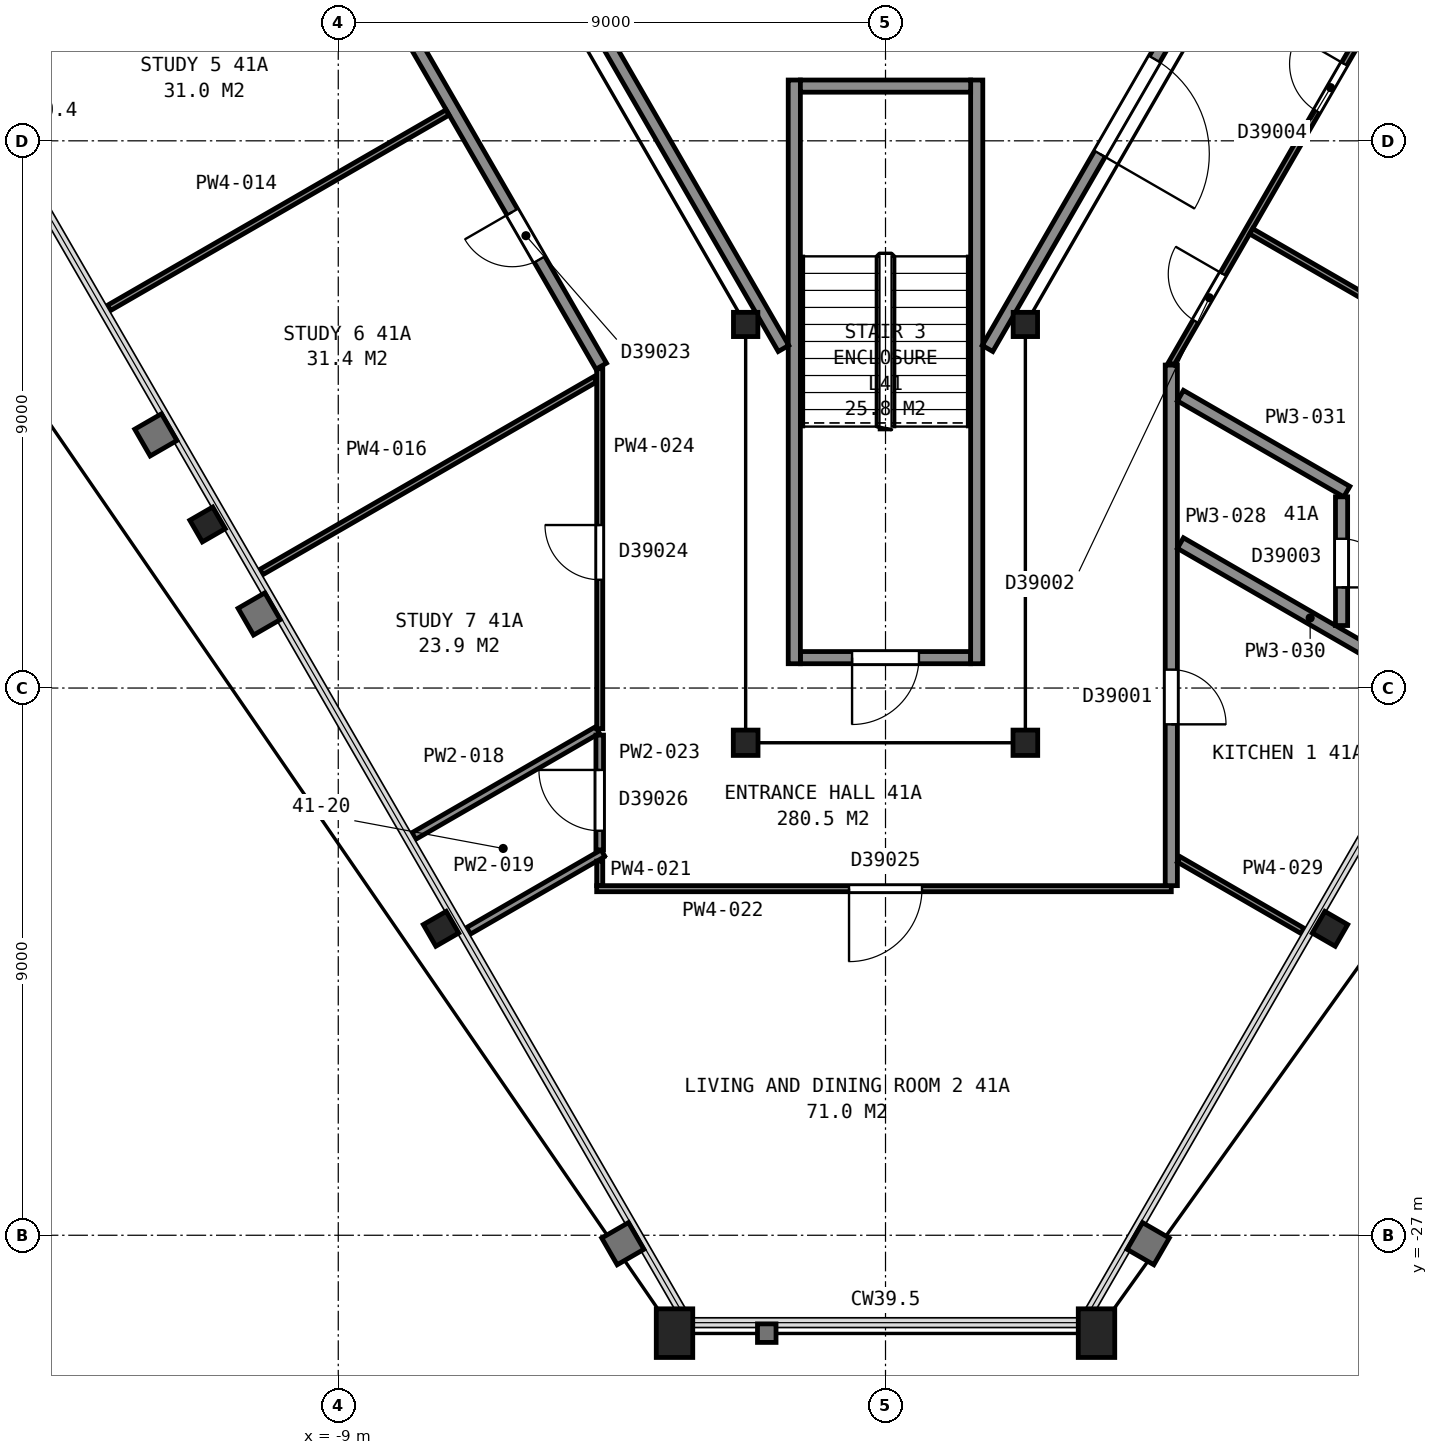
"""IFC4 building model, lengths in metres.
Left out: names, types, materials, properties, quantities, classifications, styles, units other than length and angle.
Written with IfcOpenShell. Run it as: python <this file> out.ifc"""

import sys

from ifc_helpers import new_model, si_unit, direction, frame, frame_2d, origin, origin_2d, place, context, subcontext, project, spatial, rectangle, hollow_rectangle, i_section, extrude, element, fill, save


model = new_model("IFC4")
c1 = context("Model", 3, precision=1e-05, world=origin(), true_north=direction((0.0, 1.0)))
c2 = subcontext(c1, "Body", "Model", "MODEL_VIEW")
j1 = project(units=[si_unit("LENGTHUNIT", "METRE"), si_unit("PLANEANGLEUNIT", "RADIAN")], contexts=[c1])
p1 = place(None, origin())
s1 = spatial("IfcSite", under=j1, at=p1, CompositionType="ELEMENT")
p2 = place(p1, origin())
s2 = spatial("IfcBuilding", under=s1, at=p2, CompositionType="ELEMENT")
p3 = place(p2, frame((0.0, 0.0, 167.3)))
s3 = spatial("IfcBuildingStorey", under=s2, at=p3, CompositionType="ELEMENT", Elevation=167.3)
for number, where, z_axis, x_axis in (
    (1, (-11.15, -15.31, 0.0), (0.0, 0.0, 1.0), (-0.5, 0.866, 0.0)),
    (2, (-7.31, -21.96, 0.0), (0.0, 0.0, 1.0), (-0.5, 0.866, 0.0)),
):
    element("IfcColumn", number, at=place(p3, frame(where, z_axis=z_axis, x_axis=x_axis)), inside=s3, PredefinedType="COLUMN", context=c2, shape_type="SweptSolid", body=[
        extrude(i_section(OverallWidth=0.411, OverallDepth=0.434, WebThickness=0.036, FlangeThickness=0.057, FilletRadius=0.015, at=origin_2d()), origin(), (0.0, 0.0, 1.0), 3.7),
    ])
for number, where, z_axis, x_axis in (
    (3, (-3.47, -28.61, 0.0), (0.0, 0.0, 1.0), (-1.0, 0.0, 0.0)),
    (4, (3.47, -28.61, 0.0), (0.0, 0.0, 1.0), (-1.0, 0.0, 0.0)),
):
    element("IfcColumn", number, at=place(p3, frame(where, z_axis=z_axis, x_axis=x_axis)), inside=s3, PredefinedType="COLUMN", context=c2, shape_type="SweptSolid", body=[
        extrude(hollow_rectangle(XDim=0.6, YDim=0.8, WallThickness=0.05, at=origin_2d()), origin(), (0.0, 0.0, 1.0), 3.7),
    ])
p4 = place(p3, frame((7.31, -21.96, 0.0), z_axis=(0.0, 0.0, 1.0), x_axis=(-0.5, -0.866025403784, 0.0)))
e5 = element("IfcColumn", 5, at=p4, inside=s3, PredefinedType="COLUMN", context=c2, shape_type="SweptSolid", body=[
    extrude(i_section(OverallWidth=0.411, OverallDepth=0.434, WebThickness=0.036, FlangeThickness=0.057, FilletRadius=0.015, at=origin_2d()), origin(), (0.0, 0.0, 1.0), 3.7),
])
p5 = place(p3, frame((-2.3, -12.02, 0.0), z_axis=(0.0, 0.0, 1.0), x_axis=(1.0, 0.0, 0.0)))
e6 = element("IfcColumn", 6, at=p5, inside=s3, PredefinedType="COLUMN", context=c2, shape_type="SweptSolid", body=[
    extrude(i_section(OverallWidth=0.401, OverallDepth=0.399, WebThickness=0.025, FlangeThickness=0.04, FilletRadius=0.015, at=origin_2d()), origin(), (0.0, 0.0, 1.0), 3.7),
])
for number, where, z_axis, x_axis in (
    (7, (-2.3, -18.9, 0.0), (0.0, 0.0, 1.0), (-1.0, 0.0, 0.0)),
    (8, (2.3, -18.9, 0.0), (0.0, 0.0, 1.0), (-1.0, 0.0, 0.0)),
):
    element("IfcColumn", number, at=place(p3, frame(where, z_axis=z_axis, x_axis=x_axis)), inside=s3, PredefinedType="COLUMN", context=c2, shape_type="SweptSolid", body=[
        extrude(i_section(OverallWidth=0.406, OverallDepth=0.417, WebThickness=0.03, FlangeThickness=0.048, FilletRadius=0.015, at=origin_2d()), origin(), (0.0, 0.0, 1.0), 3.7),
    ])
p6 = place(p3, frame((2.3, -12.02, 0.0), z_axis=(0.0, 0.0, 1.0), x_axis=(1.0, 0.0, 0.0)))
e9 = element("IfcColumn", 9, at=p6, inside=s3, PredefinedType="COLUMN", context=c2, shape_type="SweptSolid", body=[
    extrude(i_section(OverallWidth=0.401, OverallDepth=0.399, WebThickness=0.025, FlangeThickness=0.04, FilletRadius=0.015, at=origin_2d()), origin(), (0.0, 0.0, 1.0), 3.7),
])
p7 = place(p3, frame((-1.4, -17.5, 0.0), z_axis=(0.0, 0.0, 1.0), x_axis=(1.0, 0.0, 0.0)))
e10 = element("IfcWall", 10, at=p7, inside=s3, PredefinedType="PARTITIONING", context=c2, shape_type="SweptSolid", body=[
    extrude(rectangle(XDim=2.8, YDim=0.2, at=frame_2d((1.4, 0.0))), origin(), (0.0, 0.0, 1.0), 3.45),
])
p8 = place(p7, frame((0.85, 0.0, 0.0)))
e11 = element("IfcOpeningElement", 11, at=p8, cuts=e10, PredefinedType="OPENING", context=c2, shape_type="SweptSolid", body=[
    extrude(rectangle(XDim=1.1, YDim=2.1, at=frame_2d((0.55, 1.05))), frame((0.0, 0.11, 0.0), z_axis=(0.0, -1.0, 0.0), x_axis=(1.0, 0.0, 0.0)), (0.0, 0.0, 1.0), 0.22),
])
for number, where, z_axis, x_axis in (
    (12, (1.5, -8.0, 0.0), (0.0, 0.0, 1.0), (0.0, -1.0, 0.0)),
    (13, (-1.5, -8.0, 0.0), (0.0, 0.0, 1.0), (0.0, -1.0, 0.0)),
):
    element("IfcWall", number, at=place(p3, frame(where, z_axis=z_axis, x_axis=x_axis)), inside=s3, PredefinedType="PARTITIONING", context=c2, shape_type="SweptSolid", body=[
        extrude(rectangle(XDim=9.6, YDim=0.2, at=frame_2d((4.8, 0.0))), origin(), (0.0, 0.0, 1.0), 3.45),
    ])
p9 = place(p3, frame((-1.4, -8.1, 0.0), z_axis=(0.0, 0.0, 1.0), x_axis=(1.0, 0.0, 0.0)))
e14 = element("IfcWall", 14, at=p9, inside=s3, PredefinedType="PARTITIONING", context=c2, shape_type="SweptSolid", body=[
    extrude(rectangle(XDim=2.8, YDim=0.2, at=frame_2d((1.4, 0.0))), origin(), (0.0, 0.0, 1.0), 3.45),
])
p10 = place(p3, frame((-4.655, -7.257, 0.0), z_axis=(0.0, 0.0, 1.0), x_axis=(0.499966124405, -0.866044960985, 0.0)))
e15 = element("IfcWall", 15, at=p10, inside=s3, PredefinedType="PARTITIONING", context=c2, shape_type="SweptSolid", body=[
    extrude(rectangle(XDim=5.956, YDim=0.2, at=frame_2d((2.978, 0.0))), origin(), (0.0, 0.0, 1.0), 3.45),
])
p11 = place(p3, frame((1.677, -12.415, 0.0), z_axis=(0.0, 0.0, 1.0), x_axis=(0.500054337157, 0.865994029939, 0.0)))
e16 = element("IfcWall", 16, at=p11, inside=s3, PredefinedType="PARTITIONING", context=c2, shape_type="SweptSolid", body=[
    extrude(rectangle(XDim=6.177, YDim=0.2, at=frame_2d((3.088, 0.0))), origin(), (0.0, 0.0, 1.0), 3.45),
])
p12 = place(p11, frame((3.695, 0.0, 0.0)))
e17 = element("IfcOpeningElement", 17, at=p12, cuts=e16, PredefinedType="OPENING", context=c2, shape_type="SweptSolid", body=[
    extrude(rectangle(XDim=1.8, YDim=2.1, at=frame_2d((0.9, 1.05))), frame((0.0, 0.11, 0.0), z_axis=(0.0, -1.0, 0.0), x_axis=(1.0, 0.0, 0.0)), (0.0, 0.0, 1.0), 0.22),
])
p13 = place(p3, frame((-4.675, -12.706, 0.0), z_axis=(0.0, 0.0, 1.0), x_axis=(-0.499972470324, 0.866041297467, 0.0)))
e18 = element("IfcWall", 18, at=p13, inside=s3, PredefinedType="PARTITIONING", context=c2, shape_type="SweptSolid", body=[
    extrude(rectangle(XDim=17.385, YDim=0.2, at=frame_2d((8.692, 0.0))), origin(), (0.0, 0.0, 1.0), 2.713),
])
p14 = place(p13, frame((15.435, 0.0, 0.0)))
e19 = element("IfcOpeningElement", 19, at=p14, cuts=e18, PredefinedType="OPENING", context=c2, shape_type="SweptSolid", body=[
    extrude(rectangle(XDim=0.9, YDim=2.1, at=frame_2d((0.45, 1.05))), frame((0.0, 0.11, 0.0), z_axis=(0.0, -1.0, 0.0), x_axis=(1.0, 0.0, 0.0)), (0.0, 0.0, 1.0), 0.22),
])
p15 = place(p13, frame((12.835, 0.0, 0.0)))
e20 = element("IfcOpeningElement", 20, at=p15, cuts=e18, PredefinedType="OPENING", context=c2, shape_type="SweptSolid", body=[
    extrude(rectangle(XDim=0.9, YDim=2.1, at=frame_2d((0.45, 1.05))), frame((0.0, 0.11, 0.0), z_axis=(0.0, -1.0, 0.0), x_axis=(1.0, 0.0, 0.0)), (0.0, 0.0, 1.0), 0.22),
])
p16 = place(p13, frame((6.941, 0.0, 0.0)))
e21 = element("IfcOpeningElement", 21, at=p16, cuts=e18, PredefinedType="OPENING", context=c2, shape_type="SweptSolid", body=[
    extrude(rectangle(XDim=0.9, YDim=2.1, at=frame_2d((0.45, 1.05))), frame((0.0, 0.11, 0.0), z_axis=(0.0, -1.0, 0.0), x_axis=(1.0, 0.0, 0.0)), (0.0, 0.0, 1.0), 0.22),
])
p17 = place(p13, frame((2.028, 0.0, 0.0)))
e22 = element("IfcOpeningElement", 22, at=p17, cuts=e18, PredefinedType="OPENING", context=c2, shape_type="SweptSolid", body=[
    extrude(rectangle(XDim=0.9, YDim=2.1, at=frame_2d((0.45, 1.05))), frame((0.0, 0.11, 0.0), z_axis=(0.0, -1.0, 0.0), x_axis=(1.0, 0.0, 0.0)), (0.0, 0.0, 1.0), 0.22),
])
p18 = place(p3, frame((-12.772, -11.749, 0.0), z_axis=(0.0, 0.0, 1.0), x_axis=(0.866026229868, 0.499998569178, 0.0)))
e23 = element("IfcWall", 23, at=p18, inside=s3, PredefinedType="PARTITIONING", context=c2, shape_type="SweptSolid", body=[
    extrude(rectangle(XDim=6.429, YDim=0.1, at=frame_2d((3.215, 0.0))), origin(), (0.0, 0.0, 1.0), 2.713),
])
p19 = place(p3, frame((-10.264, -16.092, 0.0), z_axis=(0.0, 0.0, 1.0), x_axis=(0.86602074738, 0.500008065043, 0.0)))
e24 = element("IfcWall", 24, at=p19, inside=s3, PredefinedType="PARTITIONING", context=c2, shape_type="SweptSolid", body=[
    extrude(rectangle(XDim=6.339, YDim=0.1, at=frame_2d((3.169, 0.0))), origin(), (0.0, 0.0, 1.0), 2.713),
])
p20 = place(p3, frame((-7.758, -20.434, 0.0), z_axis=(0.0, 0.0, 1.0), x_axis=(0.866090019653, 0.499888065328, 0.0)))
e25 = element("IfcWall", 25, at=p20, inside=s3, PredefinedType="PARTITIONING", context=c2, shape_type="SweptSolid", body=[
    extrude(rectangle(XDim=3.488, YDim=0.125, at=frame_2d((1.744, 0.0))), origin(), (0.0, 0.0, 1.0), 2.713),
])
p21 = place(p3, frame((-6.858, -21.993, 0.0), z_axis=(0.0, 0.0, 1.0), x_axis=(0.865992952931, 0.500056202316, 0.0)))
e26 = element("IfcWall", 26, at=p21, inside=s3, PredefinedType="PARTITIONING", context=c2, shape_type="SweptSolid", body=[
    extrude(rectangle(XDim=2.554, YDim=0.125, at=frame_2d((1.277, 0.0))), origin(), (0.0, 0.0, 1.0), 2.713),
])
p22 = place(p3, frame((-4.7, -21.25, 0.0), z_axis=(0.0, 0.0, 1.0), x_axis=(0.0, 1.0, 0.0)))
e27 = element("IfcWall", 27, at=p22, inside=s3, PredefinedType="PARTITIONING", context=c2, shape_type="SweptSolid", body=[
    extrude(rectangle(XDim=0.403, YDim=0.1, at=frame_2d((0.202, 0.0))), origin(), (0.0, 0.0, 1.0), 2.713),
])
p23 = place(p3, frame((4.7, -21.3, 0.0), z_axis=(0.0, 0.0, 1.0), x_axis=(-1.0, 0.0, 0.0)))
e28 = element("IfcWall", 28, at=p23, inside=s3, PredefinedType="PARTITIONING", context=c2, shape_type="SweptSolid", body=[
    extrude(rectangle(XDim=9.45, YDim=0.1, at=frame_2d((4.725, 0.0))), origin(), (0.0, 0.0, 1.0), 2.713),
])
p24 = place(p23, frame((4.1, 0.0, 0.0)))
e29 = element("IfcOpeningElement", 29, at=p24, cuts=e28, PredefinedType="OPENING", context=c2, shape_type="SweptSolid", body=[
    extrude(rectangle(XDim=1.2, YDim=2.1, at=frame_2d((0.6, 1.05))), frame((0.0, 0.06, 0.0), z_axis=(0.0, -1.0, 0.0), x_axis=(1.0, 0.0, 0.0)), (0.0, 0.0, 1.0), 0.12),
])
p25 = place(p3, frame((-4.7, -18.774, 0.0), z_axis=(0.0, 0.0, 1.0), x_axis=(0.0, -1.0, 0.0)))
e30 = element("IfcWall", 30, at=p25, inside=s3, PredefinedType="PARTITIONING", context=c2, shape_type="SweptSolid", body=[
    extrude(rectangle(XDim=1.888, YDim=0.125, at=frame_2d((0.944, 0.0))), origin(), (0.0, 0.0, 1.0), 2.713),
])
p26 = place(p25, frame((0.573, 0.0, 0.0)))
e31 = element("IfcOpeningElement", 31, at=p26, cuts=e30, PredefinedType="OPENING", context=c2, shape_type="SweptSolid", body=[
    extrude(rectangle(XDim=1.0, YDim=2.1, at=frame_2d((0.5, 1.05))), frame((0.0, 0.073, 0.0), z_axis=(0.0, -1.0, 0.0), x_axis=(1.0, 0.0, 0.0)), (0.0, 0.0, 1.0), 0.145),
])
p27 = place(p3, frame((-4.7, -18.669, 0.0), z_axis=(0.0, 0.0, 1.0), x_axis=(0.0, 1.0, 0.0)))
e32 = element("IfcWall", 32, at=p27, inside=s3, PredefinedType="PARTITIONING", context=c2, shape_type="SweptSolid", body=[
    extrude(rectangle(XDim=5.921, YDim=0.1, at=frame_2d((2.96, 0.0))), origin(), (0.0, 0.0, 1.0), 2.713),
])
p28 = place(p27, frame((2.45, 0.0, 0.0)))
e33 = element("IfcOpeningElement", 33, at=p28, cuts=e32, PredefinedType="OPENING", context=c2, shape_type="SweptSolid", body=[
    extrude(rectangle(XDim=0.9, YDim=2.1, at=frame_2d((0.45, 1.05))), frame((0.0, 0.06, 0.0), z_axis=(0.0, -1.0, 0.0), x_axis=(1.0, 0.0, 0.0)), (0.0, 0.0, 1.0), 0.12),
])
p29 = place(p3, frame((4.7, -12.688, 0.0), z_axis=(0.0, 0.0, 1.0), x_axis=(0.0, -1.0, 0.0)))
e34 = element("IfcWall", 34, at=p29, inside=s3, PredefinedType="PARTITIONING", context=c2, shape_type="SweptSolid", body=[
    extrude(rectangle(XDim=8.562, YDim=0.2, at=frame_2d((4.281, 0.0))), origin(), (0.0, 0.0, 1.0), 2.713),
])
p30 = place(p29, frame((5.009, 0.0, 0.0)))
e35 = element("IfcOpeningElement", 35, at=p30, cuts=e34, PredefinedType="OPENING", context=c2, shape_type="SweptSolid", body=[
    extrude(rectangle(XDim=0.9, YDim=2.1, at=frame_2d((0.45, 1.05))), frame((0.0, 0.11, 0.0), z_axis=(0.0, -1.0, 0.0), x_axis=(1.0, 0.0, 0.0)), (0.0, 0.0, 1.0), 0.22),
])
p31 = place(p3, frame((4.825, -20.819, 0.0), z_axis=(0.0, 0.0, 1.0), x_axis=(0.865981189106, -0.500076574252, 0.0)))
e36 = element("IfcWall", 36, at=p31, inside=s3, PredefinedType="PARTITIONING", context=c2, shape_type="SweptSolid", body=[
    extrude(rectangle(XDim=2.347, YDim=0.1, at=frame_2d((1.174, 0.0))), origin(), (0.0, 0.0, 1.0), 2.713),
])
p32 = place(p3, frame((4.85, -15.615, 0.0), z_axis=(0.0, 0.0, 1.0), x_axis=(0.866057699548, -0.499944057923, 0.0)))
e37 = element("IfcWall", 37, at=p32, inside=s3, PredefinedType="PARTITIONING", context=c2, shape_type="SweptSolid", body=[
    extrude(rectangle(XDim=4.927, YDim=0.2, at=frame_2d((2.464, 0.0))), origin(), (0.0, 0.0, 1.0), 2.713),
])
p33 = place(p3, frame((4.85, -13.191, 0.0), z_axis=(0.0, 0.0, 1.0), x_axis=(0.866109679077, -0.499854002494, 0.0)))
e38 = element("IfcWall", 38, at=p33, inside=s3, PredefinedType="PARTITIONING", context=c2, shape_type="SweptSolid", body=[
    extrude(rectangle(XDim=3.16, YDim=0.2, at=frame_2d((1.58, 0.0))), origin(), (0.0, 0.0, 1.0), 2.713),
])
p34 = place(p3, frame((13.342, 2.306, 0.0), z_axis=(0.0, 0.0, 1.0), x_axis=(-0.49997635812, -0.866039053, 0.0)))
e39 = element("IfcWall", 39, at=p34, inside=s3, PredefinedType="PARTITIONING", context=c2, shape_type="SweptSolid", body=[
    extrude(rectangle(XDim=17.285, YDim=0.1, at=frame_2d((8.643, 0.0))), origin(), (0.0, 0.0, 1.0), 2.713),
])
p35 = place(p34, frame((15.585, 0.0, 0.0)))
e40 = element("IfcOpeningElement", 40, at=p35, cuts=e39, PredefinedType="OPENING", context=c2, shape_type="SweptSolid", body=[
    extrude(rectangle(XDim=0.9, YDim=2.1, at=frame_2d((0.45, 1.05))), frame((0.0, 0.06, 0.0), z_axis=(0.0, -1.0, 0.0), x_axis=(1.0, 0.0, 0.0)), (0.0, 0.0, 1.0), 0.12),
])
p36 = place(p34, frame((11.595, 0.0, 0.0)))
e41 = element("IfcOpeningElement", 41, at=p36, cuts=e39, PredefinedType="OPENING", context=c2, shape_type="SweptSolid", body=[
    extrude(rectangle(XDim=0.9, YDim=2.1, at=frame_2d((0.45, 1.05))), frame((0.0, 0.06, 0.0), z_axis=(0.0, -1.0, 0.0), x_axis=(1.0, 0.0, 0.0)), (0.0, 0.0, 1.0), 0.12),
])
p37 = place(p34, frame((6.171, 0.0, 0.0)))
e42 = element("IfcOpeningElement", 42, at=p37, cuts=e39, PredefinedType="OPENING", context=c2, shape_type="SweptSolid", body=[
    extrude(rectangle(XDim=0.9, YDim=2.1, at=frame_2d((0.45, 1.05))), frame((0.0, 0.06, 0.0), z_axis=(0.0, -1.0, 0.0), x_axis=(1.0, 0.0, 0.0)), (0.0, 0.0, 1.0), 0.12),
])
p38 = place(p3, frame((6.013, -10.488, 0.0), z_axis=(0.0, 0.0, 1.0), x_axis=(0.86599118531, -0.500059263454, 0.0)))
e43 = element("IfcWall", 43, at=p38, inside=s3, PredefinedType="PARTITIONING", context=c2, shape_type="SweptSolid", body=[
    extrude(rectangle(XDim=6.484, YDim=0.1, at=frame_2d((3.242, 0.0))), origin(), (0.0, 0.0, 1.0), 2.713),
])
p39 = place(p3, frame((7.5, -16.972, 0.0), z_axis=(0.0, 0.0, 1.0), x_axis=(0.0, 1.0, 0.0)))
e44 = element("IfcWall", 44, at=p39, inside=s3, PredefinedType="PARTITIONING", context=c2, shape_type="SweptSolid", body=[
    extrude(rectangle(XDim=2.117, YDim=0.2, at=frame_2d((1.059, 0.0))), origin(), (0.0, 0.0, 1.0), 2.713),
])
p40 = place(p39, frame((0.627, 0.0, 0.0)))
e45 = element("IfcOpeningElement", 45, at=p40, cuts=e44, PredefinedType="OPENING", context=c2, shape_type="SweptSolid", body=[
    extrude(rectangle(XDim=0.8, YDim=2.1, at=frame_2d((0.4, 1.05))), frame((0.0, 0.11, 0.0), z_axis=(0.0, -1.0, 0.0), x_axis=(1.0, 0.0, 0.0)), (0.0, 0.0, 1.0), 0.22),
])
p41 = place(p8, origin())
e46 = element("IfcDoor", 46, at=p41, inside=s3, OperationType="SINGLE_SWING_LEFT", PredefinedType="DOOR", context=c2, shape_type="SweptSolid", body=[
    extrude(rectangle(XDim=1.1, YDim=2.1, at=frame_2d((0.55, 1.05))), frame((0.0, 0.025, 0.0), z_axis=(0.0, -1.0, 0.0), x_axis=(1.0, 0.0, 0.0)), (0.0, 0.0, 1.0), 0.05),
])
fill(e11, e46)
p42 = place(p12, origin())
e47 = element("IfcDoor", 47, at=p42, inside=s3, OperationType="DOUBLE_DOOR_SINGLE_SWING", PredefinedType="DOOR", context=c2, shape_type="SweptSolid", body=[
    extrude(rectangle(XDim=1.8, YDim=2.1, at=frame_2d((0.9, 1.05))), frame((0.0, 0.025, 0.0), z_axis=(0.0, -1.0, 0.0), x_axis=(1.0, 0.0, 0.0)), (0.0, 0.0, 1.0), 0.05),
])
fill(e17, e47)
p43 = place(p17, origin())
e48 = element("IfcDoor", 48, at=p43, inside=s3, OperationType="SINGLE_SWING_RIGHT", PredefinedType="DOOR", context=c2, shape_type="SweptSolid", body=[
    extrude(rectangle(XDim=0.9, YDim=2.1, at=frame_2d((0.45, 1.05))), frame((0.0, 0.025, 0.0), z_axis=(0.0, -1.0, 0.0), x_axis=(1.0, 0.0, 0.0)), (0.0, 0.0, 1.0), 0.05),
])
fill(e22, e48)
p44 = place(p24, origin())
e49 = element("IfcDoor", 49, at=p44, inside=s3, OperationType="SINGLE_SWING_RIGHT", PredefinedType="DOOR", context=c2, shape_type="SweptSolid", body=[
    extrude(rectangle(XDim=1.2, YDim=2.1, at=frame_2d((0.6, 1.05))), frame((0.0, 0.025, 0.0), z_axis=(0.0, -1.0, 0.0), x_axis=(1.0, 0.0, 0.0)), (0.0, 0.0, 1.0), 0.05),
])
fill(e29, e49)
p45 = place(p26, origin())
e50 = element("IfcDoor", 50, at=p45, inside=s3, OperationType="SINGLE_SWING_LEFT", PredefinedType="DOOR", context=c2, shape_type="SweptSolid", body=[
    extrude(rectangle(XDim=1.0, YDim=2.1, at=frame_2d((0.5, 1.05))), frame((0.0, 0.025, 0.0), z_axis=(0.0, -1.0, 0.0), x_axis=(1.0, 0.0, 0.0)), (0.0, 0.0, 1.0), 0.05),
])
fill(e31, e50)
p46 = place(p28, origin())
e51 = element("IfcDoor", 51, at=p46, inside=s3, OperationType="SINGLE_SWING_RIGHT", PredefinedType="DOOR", context=c2, shape_type="SweptSolid", body=[
    extrude(rectangle(XDim=0.9, YDim=2.1, at=frame_2d((0.45, 1.05))), frame((0.0, 0.025, 0.0), z_axis=(0.0, -1.0, 0.0), x_axis=(1.0, 0.0, 0.0)), (0.0, 0.0, 1.0), 0.05),
])
fill(e33, e51)
p47 = place(p30, origin())
e52 = element("IfcDoor", 52, at=p47, inside=s3, OperationType="SINGLE_SWING_RIGHT", PredefinedType="DOOR", context=c2, shape_type="SweptSolid", body=[
    extrude(rectangle(XDim=0.9, YDim=2.1, at=frame_2d((0.45, 1.05))), frame((0.0, 0.025, 0.0), z_axis=(0.0, -1.0, 0.0), x_axis=(1.0, 0.0, 0.0)), (0.0, 0.0, 1.0), 0.05),
])
fill(e35, e52)
p48 = place(p35, origin())
e53 = element("IfcDoor", 53, at=p48, inside=s3, OperationType="SINGLE_SWING_LEFT", PredefinedType="DOOR", context=c2, shape_type="SweptSolid", body=[
    extrude(rectangle(XDim=0.9, YDim=2.1, at=frame_2d((0.45, 1.05))), frame((0.0, 0.025, 0.0), z_axis=(0.0, -1.0, 0.0), x_axis=(1.0, 0.0, 0.0)), (0.0, 0.0, 1.0), 0.05),
])
fill(e40, e53)
p49 = place(p36, origin())
e54 = element("IfcDoor", 54, at=p49, inside=s3, OperationType="SINGLE_SWING_LEFT", PredefinedType="DOOR", context=c2, shape_type="SweptSolid", body=[
    extrude(rectangle(XDim=0.9, YDim=2.1, at=frame_2d((0.45, 1.05))), frame((0.0, 0.025, 0.0), z_axis=(0.0, -1.0, 0.0), x_axis=(1.0, 0.0, 0.0)), (0.0, 0.0, 1.0), 0.05),
])
fill(e41, e54)
p50 = place(p40, origin())
e55 = element("IfcDoor", 55, at=p50, inside=s3, OperationType="SINGLE_SWING_LEFT", PredefinedType="DOOR", context=c2, shape_type="SweptSolid", body=[
    extrude(rectangle(XDim=0.8, YDim=2.1, at=frame_2d((0.4, 1.05))), frame((0.0, 0.025, 0.0), z_axis=(0.0, -1.0, 0.0), x_axis=(1.0, 0.0, 0.0)), (0.0, 0.0, 1.0), 0.05),
])
fill(e45, e55)
save(model, sys.argv[1])
